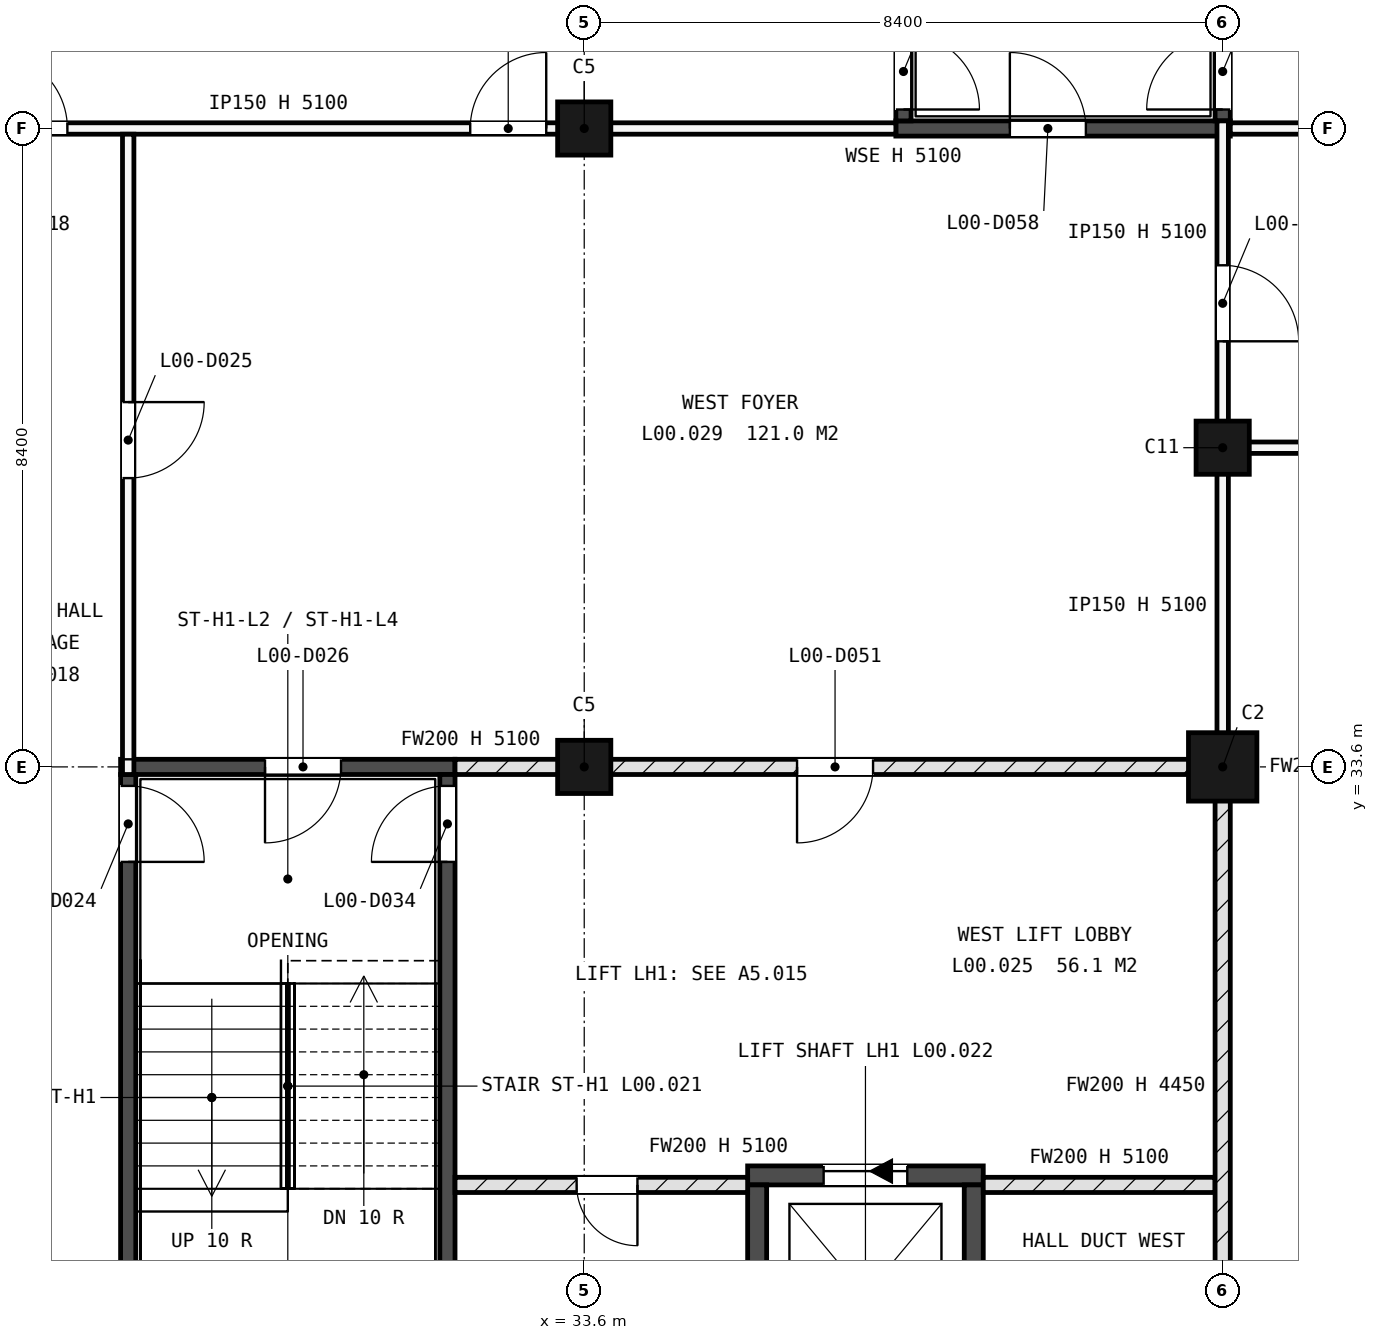
"""IFC4 building model, lengths in metres.
Left out: names, types, materials, properties, quantities, classifications, styles, units other than length and angle.
Written with IfcOpenShell. Run it as: python <this file> out.ifc"""

import sys

from ifc_helpers import new_model, si_unit, direction, frame, frame_2d, origin, origin_2d, place, context, subcontext, project, spatial, rectangle, circle, extrude, element, fill, save


model = new_model("IFC4")
c1 = context("Model", 3, precision=1e-05, world=origin(), true_north=direction((0.0, 1.0)))
c2 = subcontext(c1, "Body", "Model", "MODEL_VIEW")
j1 = project(units=[si_unit("LENGTHUNIT", "METRE"), si_unit("PLANEANGLEUNIT", "RADIAN")], contexts=[c1])
p1 = place(None, origin())
s1 = spatial("IfcSite", under=j1, at=p1, CompositionType="ELEMENT")
p2 = place(p1, origin())
s2 = spatial("IfcBuilding", under=s1, at=p2, CompositionType="ELEMENT")
p3 = place(p2, origin())
s3 = spatial("IfcBuildingStorey", under=s2, at=p3, CompositionType="ELEMENT", Elevation=0.0)
for number, where, z_axis, x_axis in (
    (1, (33.6, 33.6, -0.3), (0.0, 0.0, 1.0), (1.0, 0.0, 0.0)),
    (2, (33.6, 42.0, -0.3), (0.0, 0.0, 1.0), (1.0, 0.0, 0.0)),
):
    element("IfcColumn", number, at=place(p3, frame(where, z_axis=z_axis, x_axis=x_axis)), inside=s3, PredefinedType="COLUMN", context=c2, shape_type="SweptSolid", body=[
        extrude(rectangle(XDim=0.7, YDim=0.7, at=origin_2d()), origin(), (0.0, 0.0, 1.0), 5.4),
    ])
p4 = place(p3, frame((42.0, 33.6, -0.3), z_axis=(0.0, 0.0, 1.0), x_axis=(1.0, 0.0, 0.0)))
e3 = element("IfcColumn", 3, at=p4, inside=s3, PredefinedType="COLUMN", context=c2, shape_type="SweptSolid", body=[
    extrude(rectangle(XDim=0.9, YDim=0.9, at=origin_2d()), origin(), (0.0, 0.0, 1.0), 5.4),
])
p5 = place(p3, frame((42.0, 37.8, -0.3), z_axis=(0.0, 0.0, 1.0), x_axis=(1.0, 0.0, 0.0)))
e4 = element("IfcColumn", 4, at=p5, inside=s3, PredefinedType="COLUMN", context=c2, shape_type="SweptSolid", body=[
    extrude(circle(Radius=0.35, at=origin_2d()), origin(), (0.0, 0.0, 1.0), 5.4),
])
p6 = place(p3, frame((35.75, 28.225, -1.5), z_axis=(0.0, 0.0, 1.0), x_axis=(1.0, 0.0, 0.0)))
e5 = element("IfcWall", 5, at=p6, inside=s3, PredefinedType="SHEAR", context=c2, shape_type="SweptSolid", body=[
    extrude(rectangle(XDim=3.1, YDim=0.25, at=frame_2d((1.55, 0.0))), origin(), (0.0, 0.0, 1.0), 6.6),
])
p7 = place(p6, frame((1.0, 0.0, 1.5)))
e6 = element("IfcOpeningElement", 6, at=p7, cuts=e5, PredefinedType="OPENING", context=c2, shape_type="SweptSolid", body=[
    extrude(rectangle(XDim=1.1, YDim=2.1, at=frame_2d((0.55, 1.05))), frame((0.0, 0.135, 0.0), z_axis=(0.0, -1.0, 0.0), x_axis=(1.0, 0.0, 0.0)), (0.0, 0.0, 1.0), 0.27),
])
for number, where, z_axis, x_axis in (
    (7, (35.875, 25.2, -1.5), (0.0, 0.0, 1.0), (0.0, 1.0, 0.0)),
    (8, (38.725, 25.2, -1.5), (0.0, 0.0, 1.0), (0.0, 1.0, 0.0)),
):
    element("IfcWall", number, at=place(p3, frame(where, z_axis=z_axis, x_axis=x_axis)), inside=s3, PredefinedType="SHEAR", context=c2, shape_type="SweptSolid", body=[
        extrude(rectangle(XDim=2.9, YDim=0.25, at=frame_2d((1.45, 0.0))), origin(), (0.0, 0.0, 1.0), 6.6),
    ])
p8 = place(p3, frame((27.5, 33.6, 0.0), z_axis=(0.0, 0.0, 1.0), x_axis=(1.0, 0.0, 0.0)))
e9 = element("IfcWall", 9, at=p8, inside=s3, PredefinedType="SHEAR", context=c2, shape_type="SweptSolid", body=[
    extrude(rectangle(XDim=4.4, YDim=0.2, at=frame_2d((2.2, 0.0))), origin(), (0.0, 0.0, 1.0), 5.1),
])
p9 = place(p8, frame((1.9, 0.0, 0.0)))
e10 = element("IfcOpeningElement", 10, at=p9, cuts=e9, PredefinedType="OPENING", context=c2, shape_type="SweptSolid", body=[
    extrude(rectangle(XDim=1.0, YDim=2.1, at=frame_2d((0.5, 1.05))), frame((0.0, 0.11, 0.0), z_axis=(0.0, -1.0, 0.0), x_axis=(1.0, 0.0, 0.0)), (0.0, 0.0, 1.0), 0.22),
])
p10 = place(p3, frame((27.6, 25.3, 0.0), z_axis=(0.0, 0.0, 1.0), x_axis=(0.0, 1.0, 0.0)))
e11 = element("IfcWall", 11, at=p10, inside=s3, PredefinedType="SHEAR", context=c2, shape_type="SweptSolid", body=[
    extrude(rectangle(XDim=8.2, YDim=0.2, at=frame_2d((4.1, 0.0))), origin(), (0.0, 0.0, 1.0), 5.1),
])
p11 = place(p10, frame((7.05, 0.0, 0.0)))
e12 = element("IfcOpeningElement", 12, at=p11, cuts=e11, PredefinedType="OPENING", context=c2, shape_type="SweptSolid", body=[
    extrude(rectangle(XDim=1.0, YDim=2.1, at=frame_2d((0.5, 1.05))), frame((0.0, 0.11, 0.0), z_axis=(0.0, -1.0, 0.0), x_axis=(1.0, 0.0, 0.0)), (0.0, 0.0, 1.0), 0.22),
])
p12 = place(p3, frame((31.8, 25.3, 0.0), z_axis=(0.0, 0.0, 1.0), x_axis=(0.0, 1.0, 0.0)))
e13 = element("IfcWall", 13, at=p12, inside=s3, PredefinedType="SHEAR", context=c2, shape_type="SweptSolid", body=[
    extrude(rectangle(XDim=8.2, YDim=0.2, at=frame_2d((4.1, 0.0))), origin(), (0.0, 0.0, 1.0), 5.1),
])
p13 = place(p12, frame((7.05, 0.0, 0.0)))
e14 = element("IfcOpeningElement", 14, at=p13, cuts=e13, PredefinedType="OPENING", context=c2, shape_type="SweptSolid", body=[
    extrude(rectangle(XDim=1.0, YDim=2.1, at=frame_2d((0.5, 1.05))), frame((0.0, 0.11, 0.0), z_axis=(0.0, -1.0, 0.0), x_axis=(1.0, 0.0, 0.0)), (0.0, 0.0, 1.0), 0.22),
])
p14 = place(p3, frame((37.7, 42.0, 0.0), z_axis=(0.0, 0.0, 1.0), x_axis=(1.0, 0.0, 0.0)))
e15 = element("IfcWall", 15, at=p14, inside=s3, PredefinedType="SHEAR", context=c2, shape_type="SweptSolid", body=[
    extrude(rectangle(XDim=4.4, YDim=0.2, at=frame_2d((2.2, 0.0))), origin(), (0.0, 0.0, 1.0), 5.1),
])
p15 = place(p14, frame((1.5, 0.0, 0.0)))
e16 = element("IfcOpeningElement", 16, at=p15, cuts=e15, PredefinedType="OPENING", context=c2, shape_type="SweptSolid", body=[
    extrude(rectangle(XDim=1.0, YDim=2.1, at=frame_2d((0.5, 1.05))), frame((0.0, 0.11, 0.0), z_axis=(0.0, -1.0, 0.0), x_axis=(1.0, 0.0, 0.0)), (0.0, 0.0, 1.0), 0.22),
])
p16 = place(p3, frame((37.8, 42.1, 0.0), z_axis=(0.0, 0.0, 1.0), x_axis=(0.0, 1.0, 0.0)))
e17 = element("IfcWall", 17, at=p16, inside=s3, PredefinedType="SHEAR", context=c2, shape_type="SweptSolid", body=[
    extrude(rectangle(XDim=7.925, YDim=0.2, at=frame_2d((3.962, 0.0))), origin(), (0.0, 0.0, 1.0), 5.1),
])
p17 = place(p16, frame((0.15, 0.0, 0.0)))
e18 = element("IfcOpeningElement", 18, at=p17, cuts=e17, PredefinedType="OPENING", context=c2, shape_type="SweptSolid", body=[
    extrude(rectangle(XDim=1.0, YDim=2.1, at=frame_2d((0.5, 1.05))), frame((0.0, 0.11, 0.0), z_axis=(0.0, -1.0, 0.0), x_axis=(1.0, 0.0, 0.0)), (0.0, 0.0, 1.0), 0.22),
])
p18 = place(p3, frame((42.0, 42.1, 0.0), z_axis=(0.0, 0.0, 1.0), x_axis=(0.0, 1.0, 0.0)))
e19 = element("IfcWall", 19, at=p18, inside=s3, PredefinedType="SHEAR", context=c2, shape_type="SweptSolid", body=[
    extrude(rectangle(XDim=7.925, YDim=0.2, at=frame_2d((3.962, 0.0))), origin(), (0.0, 0.0, 1.0), 5.1),
])
p19 = place(p18, frame((0.15, 0.0, 0.0)))
e20 = element("IfcOpeningElement", 20, at=p19, cuts=e19, PredefinedType="OPENING", context=c2, shape_type="SweptSolid", body=[
    extrude(rectangle(XDim=1.0, YDim=2.1, at=frame_2d((0.5, 1.05))), frame((0.0, 0.11, 0.0), z_axis=(0.0, -1.0, 0.0), x_axis=(1.0, 0.0, 0.0)), (0.0, 0.0, 1.0), 0.22),
])
p20 = place(p3, frame((31.9, 28.1, 0.0), z_axis=(0.0, 0.0, 1.0), x_axis=(1.0, 0.0, 0.0)))
e21 = element("IfcWall", 21, at=p20, inside=s3, PredefinedType="SOLIDWALL", context=c2, shape_type="SweptSolid", body=[
    extrude(rectangle(XDim=3.85, YDim=0.2, at=frame_2d((1.925, 0.0))), origin(), (0.0, 0.0, 1.0), 5.1),
])
p21 = place(p20, frame((1.6, 0.0, 0.0)))
e22 = element("IfcOpeningElement", 22, at=p21, cuts=e21, PredefinedType="OPENING", context=c2, shape_type="SweptSolid", body=[
    extrude(rectangle(XDim=0.8, YDim=2.1, at=frame_2d((0.4, 1.05))), frame((0.0, 0.11, 0.0), z_axis=(0.0, -1.0, 0.0), x_axis=(1.0, 0.0, 0.0)), (0.0, 0.0, 1.0), 0.22),
])
p22 = place(p3, frame((38.85, 28.1, 0.0), z_axis=(0.0, 0.0, 1.0), x_axis=(1.0, 0.0, 0.0)))
e23 = element("IfcWall", 23, at=p22, inside=s3, PredefinedType="SOLIDWALL", context=c2, shape_type="SweptSolid", body=[
    extrude(rectangle(XDim=3.05, YDim=0.2, at=frame_2d((1.525, 0.0))), origin(), (0.0, 0.0, 1.0), 5.1),
])
p23 = place(p3, frame((31.9, 33.6, 0.0), z_axis=(0.0, 0.0, 1.0), x_axis=(1.0, 0.0, 0.0)))
e24 = element("IfcWall", 24, at=p23, inside=s3, PredefinedType="SOLIDWALL", context=c2, shape_type="SweptSolid", body=[
    extrude(rectangle(XDim=2.03, YDim=0.2, at=frame_2d((1.015, 0.0))), origin(), (0.0, 0.0, 1.0), 5.1),
])
p24 = place(p3, frame((33.93, 33.6, 0.0), z_axis=(0.0, 0.0, 1.0), x_axis=(1.0, 0.0, 0.0)))
e25 = element("IfcWall", 25, at=p24, inside=s3, PredefinedType="SOLIDWALL", context=c2, shape_type="SweptSolid", body=[
    extrude(rectangle(XDim=8.17, YDim=0.2, at=frame_2d((4.085, 0.0))), origin(), (0.0, 0.0, 1.0), 4.3),
])
p25 = place(p24, frame((2.47, 0.0, 0.0)))
e26 = element("IfcOpeningElement", 26, at=p25, cuts=e25, PredefinedType="OPENING", context=c2, shape_type="SweptSolid", body=[
    extrude(rectangle(XDim=1.0, YDim=2.1, at=frame_2d((0.5, 1.05))), frame((0.0, 0.11, 0.0), z_axis=(0.0, -1.0, 0.0), x_axis=(1.0, 0.0, 0.0)), (0.0, 0.0, 1.0), 0.22),
])
p26 = place(p3, frame((41.925, 37.8, 0.0), z_axis=(0.0, 0.0, 1.0), x_axis=(1.0, 0.0, 0.0)))
e27 = element("IfcWall", 27, at=p26, inside=s3, PredefinedType="PARTITIONING", context=c2, shape_type="SweptSolid", body=[
    extrude(rectangle(XDim=42.15, YDim=0.15, at=frame_2d((21.075, 0.0))), origin(), (0.0, 0.0, 1.0), 4.2),
])
p27 = place(p26, frame((19.875, 0.0, 0.0)))
e28 = element("IfcOpeningElement", 28, at=p27, cuts=e27, PredefinedType="OPENING", context=c2, shape_type="SweptSolid", body=[
    extrude(rectangle(XDim=2.4, YDim=2.1, at=frame_2d((1.2, 1.05))), frame((0.0, 0.085, 0.0), z_axis=(0.0, -1.0, 0.0), x_axis=(1.0, 0.0, 0.0)), (0.0, 0.0, 1.0), 0.17),
])
p28 = place(p3, frame((25.2, 42.0, 0.0), z_axis=(0.0, 0.0, 1.0), x_axis=(1.0, 0.0, 0.0)))
e29 = element("IfcWall", 29, at=p28, inside=s3, PredefinedType="PARTITIONING", context=c2, shape_type="SweptSolid", body=[
    extrude(rectangle(XDim=12.5, YDim=0.15, at=frame_2d((6.25, 0.0))), origin(), (0.0, 0.0, 1.0), 5.1),
])
p29 = place(p28, frame((0.6, 0.0, 0.0)))
e30 = element("IfcOpeningElement", 30, at=p29, cuts=e29, PredefinedType="OPENING", context=c2, shape_type="SweptSolid", body=[
    extrude(rectangle(XDim=1.0, YDim=2.1, at=frame_2d((0.5, 1.05))), frame((0.0, 0.085, 0.0), z_axis=(0.0, -1.0, 0.0), x_axis=(1.0, 0.0, 0.0)), (0.0, 0.0, 1.0), 0.17),
])
p30 = place(p28, frame((6.9, 0.0, 0.0)))
e31 = element("IfcOpeningElement", 31, at=p30, cuts=e29, PredefinedType="OPENING", context=c2, shape_type="SweptSolid", body=[
    extrude(rectangle(XDim=1.0, YDim=2.1, at=frame_2d((0.5, 1.05))), frame((0.0, 0.085, 0.0), z_axis=(0.0, -1.0, 0.0), x_axis=(1.0, 0.0, 0.0)), (0.0, 0.0, 1.0), 0.17),
])
p31 = place(p3, frame((42.1, 42.0, 0.0), z_axis=(0.0, 0.0, 1.0), x_axis=(1.0, 0.0, 0.0)))
e32 = element("IfcWall", 32, at=p31, inside=s3, PredefinedType="PARTITIONING", context=c2, shape_type="SweptSolid", body=[
    extrude(rectangle(XDim=8.58, YDim=0.15, at=frame_2d((4.29, 0.0))), origin(), (0.0, 0.0, 1.0), 5.1),
])
p32 = place(p3, frame((27.6, 33.5, 0.0), z_axis=(0.0, 0.0, 1.0), x_axis=(0.0, 1.0, 0.0)))
e33 = element("IfcWall", 33, at=p32, inside=s3, PredefinedType="PARTITIONING", context=c2, shape_type="SweptSolid", body=[
    extrude(rectangle(XDim=8.425, YDim=0.15, at=frame_2d((4.212, 0.0))), origin(), (0.0, 0.0, 1.0), 5.1),
])
p33 = place(p32, frame((3.9, 0.0, 0.0)))
e34 = element("IfcOpeningElement", 34, at=p33, cuts=e33, PredefinedType="OPENING", context=c2, shape_type="SweptSolid", body=[
    extrude(rectangle(XDim=1.0, YDim=2.1, at=frame_2d((0.5, 1.05))), frame((0.0, 0.085, 0.0), z_axis=(0.0, -1.0, 0.0), x_axis=(1.0, 0.0, 0.0)), (0.0, 0.0, 1.0), 0.17),
])
p34 = place(p3, frame((42.0, 25.3, 0.0), z_axis=(0.0, 0.0, 1.0), x_axis=(0.0, 1.0, 0.0)))
e35 = element("IfcWall", 35, at=p34, inside=s3, PredefinedType="SOLIDWALL", context=c2, shape_type="SweptSolid", body=[
    extrude(rectangle(XDim=8.2, YDim=0.2, at=frame_2d((4.1, 0.0))), origin(), (0.0, 0.0, 1.0), 4.45),
])
p35 = place(p3, frame((42.0, 33.7, 0.0), z_axis=(0.0, 0.0, 1.0), x_axis=(0.0, 1.0, 0.0)))
e36 = element("IfcWall", 36, at=p35, inside=s3, PredefinedType="PARTITIONING", context=c2, shape_type="SweptSolid", body=[
    extrude(rectangle(XDim=4.025, YDim=0.15, at=frame_2d((2.013, 0.0))), origin(), (0.0, 0.0, 1.0), 5.1),
])
p36 = place(p3, frame((42.0, 37.875, 0.0), z_axis=(0.0, 0.0, 1.0), x_axis=(0.0, 1.0, 0.0)))
e37 = element("IfcWall", 37, at=p36, inside=s3, PredefinedType="PARTITIONING", context=c2, shape_type="SweptSolid", body=[
    extrude(rectangle(XDim=4.225, YDim=0.15, at=frame_2d((2.113, 0.0))), origin(), (0.0, 0.0, 1.0), 5.1),
])
p37 = place(p36, frame((1.325, 0.0, 0.0)))
e38 = element("IfcOpeningElement", 38, at=p37, cuts=e37, PredefinedType="OPENING", context=c2, shape_type="SweptSolid", body=[
    extrude(rectangle(XDim=1.0, YDim=2.1, at=frame_2d((0.5, 1.05))), frame((0.0, 0.085, 0.0), z_axis=(0.0, -1.0, 0.0), x_axis=(1.0, 0.0, 0.0)), (0.0, 0.0, 1.0), 0.17),
])
p38 = place(p7, origin())
e39 = element("IfcDoor", 39, at=p38, inside=s3, OperationType="SLIDING_TO_LEFT", PredefinedType="DOOR", context=c2, shape_type="SweptSolid", body=[
    extrude(rectangle(XDim=1.1, YDim=2.1, at=frame_2d((0.55, 1.05))), frame((0.0, 0.025, 0.0), z_axis=(0.0, -1.0, 0.0), x_axis=(1.0, 0.0, 0.0)), (0.0, 0.0, 1.0), 0.05),
])
fill(e6, e39)
p39 = place(p11, origin())
e40 = element("IfcDoor", 40, at=p39, inside=s3, OperationType="SINGLE_SWING_LEFT", PredefinedType="DOOR", context=c2, shape_type="SweptSolid", body=[
    extrude(rectangle(XDim=1.0, YDim=2.1, at=frame_2d((0.5, 1.05))), frame((0.0, 0.025, 0.0), z_axis=(0.0, -1.0, 0.0), x_axis=(1.0, 0.0, 0.0)), (0.0, 0.0, 1.0), 0.05),
])
fill(e12, e40)
p40 = place(p13, origin())
e41 = element("IfcDoor", 41, at=p40, inside=s3, OperationType="SINGLE_SWING_RIGHT", PredefinedType="DOOR", context=c2, shape_type="SweptSolid", body=[
    extrude(rectangle(XDim=1.0, YDim=2.1, at=frame_2d((0.5, 1.05))), frame((0.0, 0.025, 0.0), z_axis=(0.0, -1.0, 0.0), x_axis=(1.0, 0.0, 0.0)), (0.0, 0.0, 1.0), 0.05),
])
fill(e14, e41)
p41 = place(p19, origin())
e42 = element("IfcDoor", 42, at=p41, inside=s3, OperationType="SINGLE_SWING_RIGHT", PredefinedType="DOOR", context=c2, shape_type="SweptSolid", body=[
    extrude(rectangle(XDim=1.0, YDim=2.1, at=frame_2d((0.5, 1.05))), frame((0.0, 0.025, 0.0), z_axis=(0.0, -1.0, 0.0), x_axis=(1.0, 0.0, 0.0)), (0.0, 0.0, 1.0), 0.05),
])
fill(e20, e42)
p42 = place(p17, origin())
e43 = element("IfcDoor", 43, at=p42, inside=s3, OperationType="SINGLE_SWING_LEFT", PredefinedType="DOOR", context=c2, shape_type="SweptSolid", body=[
    extrude(rectangle(XDim=1.0, YDim=2.1, at=frame_2d((0.5, 1.05))), frame((0.0, 0.025, 0.0), z_axis=(0.0, -1.0, 0.0), x_axis=(1.0, 0.0, 0.0)), (0.0, 0.0, 1.0), 0.05),
])
fill(e18, e43)
p43 = place(p21, origin())
e44 = element("IfcDoor", 44, at=p43, inside=s3, OperationType="SINGLE_SWING_RIGHT", PredefinedType="DOOR", context=c2, shape_type="SweptSolid", body=[
    extrude(rectangle(XDim=0.8, YDim=2.1, at=frame_2d((0.4, 1.05))), frame((0.0, 0.025, 0.0), z_axis=(0.0, -1.0, 0.0), x_axis=(1.0, 0.0, 0.0)), (0.0, 0.0, 1.0), 0.05),
])
fill(e22, e44)
p44 = place(p25, origin())
e45 = element("IfcDoor", 45, at=p44, inside=s3, OperationType="SINGLE_SWING_LEFT", PredefinedType="DOOR", context=c2, shape_type="SweptSolid", body=[
    extrude(rectangle(XDim=1.0, YDim=2.1, at=frame_2d((0.5, 1.05))), frame((0.0, 0.025, 0.0), z_axis=(0.0, -1.0, 0.0), x_axis=(1.0, 0.0, 0.0)), (0.0, 0.0, 1.0), 0.05),
])
fill(e26, e45)
p45 = place(p33, origin())
e46 = element("IfcDoor", 46, at=p45, inside=s3, OperationType="SINGLE_SWING_RIGHT", PredefinedType="DOOR", context=c2, shape_type="SweptSolid", body=[
    extrude(rectangle(XDim=1.0, YDim=2.1, at=frame_2d((0.5, 1.05))), frame((0.0, 0.025, 0.0), z_axis=(0.0, -1.0, 0.0), x_axis=(1.0, 0.0, 0.0)), (0.0, 0.0, 1.0), 0.05),
])
fill(e34, e46)
p46 = place(p29, origin())
e47 = element("IfcDoor", 47, at=p46, inside=s3, OperationType="SINGLE_SWING_RIGHT", PredefinedType="DOOR", context=c2, shape_type="SweptSolid", body=[
    extrude(rectangle(XDim=1.0, YDim=2.1, at=frame_2d((0.5, 1.05))), frame((0.0, 0.025, 0.0), z_axis=(0.0, -1.0, 0.0), x_axis=(1.0, 0.0, 0.0)), (0.0, 0.0, 1.0), 0.05),
])
fill(e30, e47)
p47 = place(p9, origin())
e48 = element("IfcDoor", 48, at=p47, inside=s3, OperationType="SINGLE_SWING_LEFT", PredefinedType="DOOR", context=c2, shape_type="SweptSolid", body=[
    extrude(rectangle(XDim=1.0, YDim=2.1, at=frame_2d((0.5, 1.05))), frame((0.0, 0.025, 0.0), z_axis=(0.0, -1.0, 0.0), x_axis=(1.0, 0.0, 0.0)), (0.0, 0.0, 1.0), 0.05),
])
fill(e10, e48)
p48 = place(p37, origin())
e49 = element("IfcDoor", 49, at=p48, inside=s3, OperationType="SINGLE_SWING_LEFT", PredefinedType="DOOR", context=c2, shape_type="SweptSolid", body=[
    extrude(rectangle(XDim=1.0, YDim=2.1, at=frame_2d((0.5, 1.05))), frame((0.0, 0.025, 0.0), z_axis=(0.0, -1.0, 0.0), x_axis=(1.0, 0.0, 0.0)), (0.0, 0.0, 1.0), 0.05),
])
fill(e38, e49)
p49 = place(p30, origin())
e50 = element("IfcDoor", 50, at=p49, inside=s3, OperationType="SINGLE_SWING_LEFT", PredefinedType="DOOR", context=c2, shape_type="SweptSolid", body=[
    extrude(rectangle(XDim=1.0, YDim=2.1, at=frame_2d((0.5, 1.05))), frame((0.0, 0.025, 0.0), z_axis=(0.0, -1.0, 0.0), x_axis=(1.0, 0.0, 0.0)), (0.0, 0.0, 1.0), 0.05),
])
fill(e31, e50)
p50 = place(p15, origin())
e51 = element("IfcDoor", 51, at=p50, inside=s3, OperationType="SINGLE_SWING_RIGHT", PredefinedType="DOOR", context=c2, shape_type="SweptSolid", body=[
    extrude(rectangle(XDim=1.0, YDim=2.1, at=frame_2d((0.5, 1.05))), frame((0.0, 0.025, 0.0), z_axis=(0.0, -1.0, 0.0), x_axis=(1.0, 0.0, 0.0)), (0.0, 0.0, 1.0), 0.05),
])
fill(e16, e51)
save(model, sys.argv[1])
